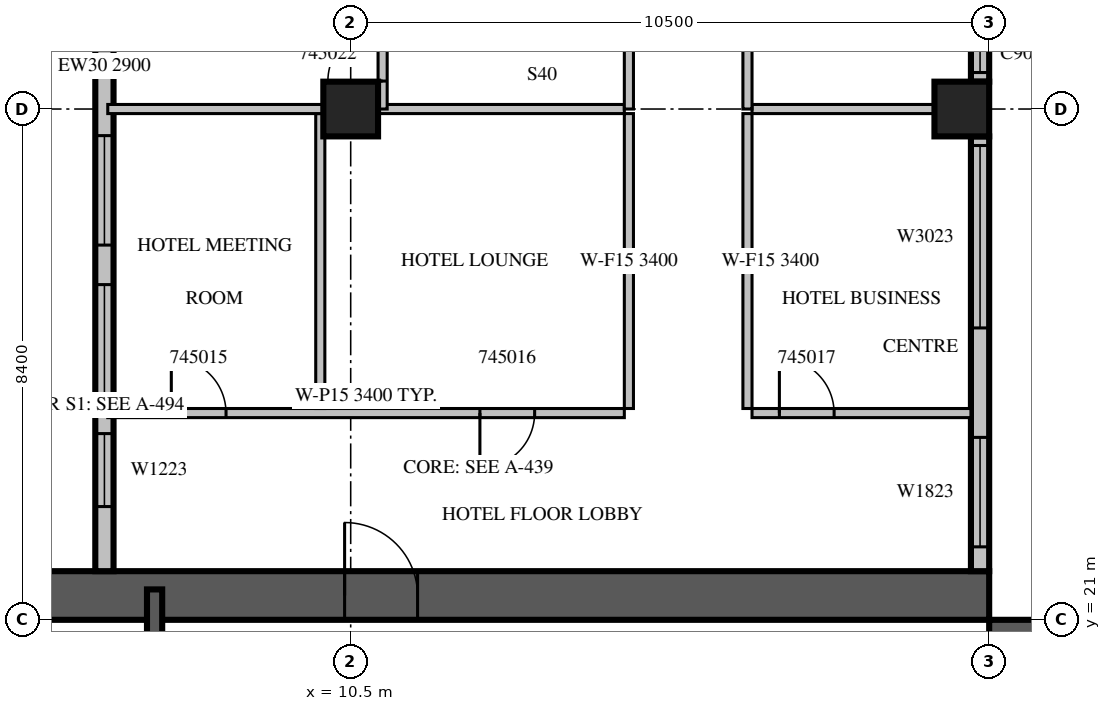
"""IFC4 building model, lengths in metres.
Left out: names, types, materials, properties, quantities, classifications, styles, units other than length and angle.
Written with IfcOpenShell. Run it as: python <this file> out.ifc"""

import sys

from ifc_helpers import new_model, si_unit, direction, frame, frame_2d, origin, origin_2d, place, context, subcontext, project, spatial, rectangle, extrude, source, transform, mapped, element, fill, save


model = new_model("IFC4")
c1 = context("Model", 3, precision=1e-05, world=origin(), true_north=direction((0.0, 1.0)))
c2 = subcontext(c1, "Body", "Model", "MODEL_VIEW")
j1 = project(units=[si_unit("LENGTHUNIT", "METRE"), si_unit("PLANEANGLEUNIT", "RADIAN")], contexts=[c1])
p1 = place(None, origin())
s1 = spatial("IfcSite", under=j1, at=p1, CompositionType="ELEMENT")
p2 = place(p1, origin())
s2 = spatial("IfcBuilding", under=s1, at=p2, CompositionType="ELEMENT")
p3 = place(p2, frame((0.0, 0.0, 204.4)))
s3 = spatial("IfcBuildingStorey", under=s2, at=p3, CompositionType="ELEMENT", Elevation=204.4)
m1 = source(origin(), c2, "Body", "SweptSolid", [
    extrude(rectangle(XDim=0.9, YDim=0.9, at=origin_2d()), origin(), (0.0, 0.0, 1.0), 3.8),
])
for number, where, z_axis, x_axis in (
    (1, (10.5, 29.4, 0.0), (0.0, 0.0, 1.0), (1.0, 0.0, 0.0)),
    (2, (20.55, 29.4, 0.0), (0.0, 0.0, 1.0), (1.0, 0.0, 0.0)),
):
    element("IfcColumn", number, at=place(p3, frame(where, z_axis=z_axis, x_axis=x_axis)), inside=s3, PredefinedType="COLUMN", context=c2, shape_type="MappedRepresentation", body=[
        mapped(m1, transform((0.0, 0.0, 0.0), scale=1.0)),
    ])
m2 = source(origin(), c2, "Body", "SweptSolid", [
    extrude(rectangle(XDim=16.8, YDim=0.8, at=frame_2d((8.4, 0.0))), origin(), (0.0, 0.0, 1.0), 3.8),
])
p4 = place(p3, frame((21.4, 4.2, 0.0), z_axis=(0.0, 0.0, 1.0), x_axis=(0.0, 1.0, 0.0)))
e3 = element("IfcWall", 3, at=p4, inside=s3, PredefinedType="SHEAR", context=c2, shape_type="MappedRepresentation", body=[
    mapped(m2, transform((0.0, 0.0, 0.0), scale=1.0)),
])
m3 = source(origin(), c2, "Body", "SweptSolid", [
    extrude(rectangle(XDim=2.2, YDim=2.1, at=frame_2d((1.1, 1.05))), frame((0.0, 0.41, 0.0), z_axis=(0.0, -1.0, 0.0), x_axis=(1.0, 0.0, 0.0)), (0.0, 0.0, 1.0), 0.82),
])
p5 = place(p4, frame((4.2, 0.0, 0.0)))
e4 = element("IfcOpeningElement", 4, at=p5, cuts=e3, PredefinedType="OPENING", context=c2, shape_type="MappedRepresentation", body=[
    mapped(m3, transform((0.0, 0.0, 0.0), scale=1.0)),
])
m4 = source(origin(), c2, "Body", "SweptSolid", [
    extrude(rectangle(XDim=1.2, YDim=2.1, at=frame_2d((0.6, 1.05))), frame((0.0, 0.41, 0.0), z_axis=(0.0, -1.0, 0.0), x_axis=(1.0, 0.0, 0.0)), (0.0, 0.0, 1.0), 0.82),
])
p6 = place(p4, frame((14.7, 0.0, 0.0)))
e5 = element("IfcOpeningElement", 5, at=p6, cuts=e3, PredefinedType="OPENING", context=c2, shape_type="MappedRepresentation", body=[
    mapped(m4, transform((0.0, 0.0, 0.0), scale=1.0)),
])
p7 = place(p3, frame((4.2, 21.4, 0.0), z_axis=(0.0, 0.0, 1.0), x_axis=(1.0, 0.0, 0.0)))
e6 = element("IfcWall", 6, at=p7, inside=s3, PredefinedType="SHEAR", context=c2, shape_type="MappedRepresentation", body=[
    mapped(m2, transform((0.0, 0.0, 0.0), scale=1.0)),
])
p8 = place(p7, frame((6.2, 0.0, 0.0)))
e7 = element("IfcOpeningElement", 7, at=p8, cuts=e6, PredefinedType="OPENING", context=c2, shape_type="MappedRepresentation", body=[
    mapped(m4, transform((0.0, 0.0, 0.0), scale=1.0)),
])
m5 = source(origin(), c2, "Body", "SweptSolid", [
    extrude(rectangle(XDim=7.15, YDim=0.3, at=frame_2d((3.575, 0.0))), origin(), (0.0, 0.0, 1.0), 3.4),
])
p9 = place(p3, frame((20.85, 21.8, 0.0), z_axis=(0.0, 0.0, 1.0), x_axis=(0.0, 1.0, 0.0)))
e8 = element("IfcWall", 8, at=p9, inside=s3, PredefinedType="STANDARD", context=c2, shape_type="MappedRepresentation", body=[
    mapped(m5, transform((0.0, 0.0, 0.0), scale=1.0)),
])
m6 = source(origin(), c2, "Body", "SweptSolid", [
    extrude(rectangle(XDim=1.8, YDim=2.3, at=frame_2d((0.9, 1.15))), frame((0.0, 0.16, 0.0), z_axis=(0.0, -1.0, 0.0), x_axis=(1.0, 0.0, 0.0)), (0.0, 0.0, 1.0), 0.32),
])
p10 = place(p9, frame((0.4, 0.0, 0.6)))
e9 = element("IfcOpeningElement", 9, at=p10, cuts=e8, PredefinedType="OPENING", context=c2, shape_type="MappedRepresentation", body=[
    mapped(m6, transform((0.0, 0.0, 0.0), scale=1.0)),
])
m7 = source(origin(), c2, "Body", "SweptSolid", [
    extrude(rectangle(XDim=3.0, YDim=2.3, at=frame_2d((1.5, 1.15))), frame((0.0, 0.16, 0.0), z_axis=(0.0, -1.0, 0.0), x_axis=(1.0, 0.0, 0.0)), (0.0, 0.0, 1.0), 0.32),
])
p11 = place(p9, frame((4.0, 0.0, 0.6)))
e10 = element("IfcOpeningElement", 10, at=p11, cuts=e8, PredefinedType="OPENING", context=c2, shape_type="MappedRepresentation", body=[
    mapped(m7, transform((0.0, 0.0, 0.0), scale=1.0)),
])
m8 = source(origin(), c2, "Body", "SweptSolid", [
    extrude(rectangle(XDim=7.5, YDim=0.3, at=frame_2d((3.75, 0.0))), origin(), (0.0, 0.0, 1.0), 2.9),
])
p12 = place(p3, frame((20.85, 29.85, 0.0), z_axis=(0.0, 0.0, 1.0), x_axis=(0.0, 1.0, 0.0)))
e11 = element("IfcWall", 11, at=p12, inside=s3, PredefinedType="STANDARD", context=c2, shape_type="MappedRepresentation", body=[
    mapped(m8, transform((0.0, 0.0, 0.0), scale=1.0)),
])
p13 = place(p12, frame((0.15, 0.0, 0.6)))
e12 = element("IfcOpeningElement", 12, at=p13, cuts=e11, PredefinedType="OPENING", context=c2, shape_type="MappedRepresentation", body=[
    mapped(m7, transform((0.0, 0.0, 0.0), scale=1.0)),
])
p14 = place(p12, frame((4.35, 0.0, 0.6)))
e13 = element("IfcOpeningElement", 13, at=p14, cuts=e11, PredefinedType="OPENING", context=c2, shape_type="MappedRepresentation", body=[
    mapped(m7, transform((0.0, 0.0, 0.0), scale=1.0)),
])
p15 = place(p3, frame((6.45, 38.4, 0.0), z_axis=(0.0, 0.0, 1.0), x_axis=(0.0, -1.0, 0.0)))
e14 = element("IfcWall", 14, at=p15, inside=s3, PredefinedType="STANDARD", context=c2, shape_type="SweptSolid", body=[
    extrude(rectangle(XDim=16.6, YDim=0.3, at=frame_2d((8.3, 0.0))), origin(), (0.0, 0.0, 1.0), 2.9),
])
p16 = place(p15, frame((1.15, 0.0, 0.6)))
e15 = element("IfcOpeningElement", 15, at=p16, cuts=e14, PredefinedType="OPENING", context=c2, shape_type="MappedRepresentation", body=[
    mapped(m6, transform((0.0, 0.0, 0.0), scale=1.0)),
])
p17 = place(p15, frame((5.162, 0.0, 0.6)))
e16 = element("IfcOpeningElement", 16, at=p17, cuts=e14, PredefinedType="OPENING", context=c2, shape_type="MappedRepresentation", body=[
    mapped(m6, transform((0.0, 0.0, 0.0), scale=1.0)),
])
p18 = place(p15, frame((9.438, 0.0, 0.6)))
e17 = element("IfcOpeningElement", 17, at=p18, cuts=e14, PredefinedType="OPENING", context=c2, shape_type="MappedRepresentation", body=[
    mapped(m6, transform((0.0, 0.0, 0.0), scale=1.0)),
])
m9 = source(origin(), c2, "Body", "SweptSolid", [
    extrude(rectangle(XDim=1.2, YDim=2.3, at=frame_2d((0.6, 1.15))), frame((0.0, 0.16, 0.0), z_axis=(0.0, -1.0, 0.0), x_axis=(1.0, 0.0, 0.0)), (0.0, 0.0, 1.0), 0.32),
])
p19 = place(p15, frame((14.338, 0.0, 0.6)))
e18 = element("IfcOpeningElement", 18, at=p19, cuts=e14, PredefinedType="OPENING", context=c2, shape_type="MappedRepresentation", body=[
    mapped(m9, transform((0.0, 0.0, 0.0), scale=1.0)),
])
p20 = place(p15, frame((11.887, 0.0, 0.6)))
e19 = element("IfcOpeningElement", 19, at=p20, cuts=e14, PredefinedType="OPENING", context=c2, shape_type="MappedRepresentation", body=[
    mapped(m6, transform((0.0, 0.0, 0.0), scale=1.0)),
])
m10 = source(origin(), c2, "Body", "SweptSolid", [
    extrude(rectangle(XDim=6.6, YDim=0.25, at=frame_2d((3.3, 0.0))), origin(), (0.0, 0.0, 1.0), 3.4),
])
p21 = place(p3, frame((7.275, 14.9, 0.0), z_axis=(0.0, 0.0, 1.0), x_axis=(0.0, 1.0, 0.0)))
e20 = element("IfcWall", 20, at=p21, inside=s3, PredefinedType="SOLIDWALL", context=c2, shape_type="MappedRepresentation", body=[
    mapped(m10, transform((0.0, 0.0, 0.0), scale=1.0)),
])
m11 = source(origin(), c2, "Body", "SweptSolid", [
    extrude(rectangle(XDim=1.1, YDim=2.1, at=frame_2d((0.55, 1.05))), frame((0.0, 0.135, 0.0), z_axis=(0.0, -1.0, 0.0), x_axis=(1.0, 0.0, 0.0)), (0.0, 0.0, 1.0), 0.27),
])
p22 = place(p21, frame((0.15, 0.0, 0.0)))
e21 = element("IfcOpeningElement", 21, at=p22, cuts=e20, PredefinedType="OPENING", context=c2, shape_type="MappedRepresentation", body=[
    mapped(m11, transform((0.0, 0.0, 0.0), scale=1.0)),
])
m12 = source(origin(), c2, "Body", "SweptSolid", [
    extrude(rectangle(XDim=8.495, YDim=0.15, at=frame_2d((4.247, 0.0))), origin(), (0.0, 0.0, 1.0), 3.4),
])
p23 = place(p3, frame((6.505, 24.4, 0.0), z_axis=(0.0, 0.0, 1.0), x_axis=(1.0, 0.0, 0.0)))
e22 = element("IfcWall", 22, at=p23, inside=s3, PredefinedType="PARTITIONING", context=c2, shape_type="MappedRepresentation", body=[
    mapped(m12, transform((0.0, 0.0, 0.0), scale=1.0)),
])
m13 = source(origin(), c2, "Body", "SweptSolid", [
    extrude(rectangle(XDim=0.9, YDim=2.1, at=frame_2d((0.45, 1.05))), frame((0.0, 0.085, 0.0), z_axis=(0.0, -1.0, 0.0), x_axis=(1.0, 0.0, 0.0)), (0.0, 0.0, 1.0), 0.17),
])
p24 = place(p23, frame((1.045, 0.0, 0.0)))
e23 = element("IfcOpeningElement", 23, at=p24, cuts=e22, PredefinedType="OPENING", context=c2, shape_type="MappedRepresentation", body=[
    mapped(m13, transform((0.0, 0.0, 0.0), scale=1.0)),
])
p25 = place(p23, frame((6.12, 0.0, 0.0)))
e24 = element("IfcOpeningElement", 24, at=p25, cuts=e22, PredefinedType="OPENING", context=c2, shape_type="MappedRepresentation", body=[
    mapped(m13, transform((0.0, 0.0, 0.0), scale=1.0)),
])
m14 = source(origin(), c2, "Body", "SweptSolid", [
    extrude(rectangle(XDim=3.6, YDim=0.15, at=frame_2d((1.8, 0.0))), origin(), (0.0, 0.0, 1.0), 3.4),
])
p26 = place(p3, frame((17.1, 24.4, 0.0), z_axis=(0.0, 0.0, 1.0), x_axis=(1.0, 0.0, 0.0)))
e25 = element("IfcWall", 25, at=p26, inside=s3, PredefinedType="PARTITIONING", context=c2, shape_type="MappedRepresentation", body=[
    mapped(m14, transform((0.0, 0.0, 0.0), scale=1.0)),
])
p27 = place(p26, frame((0.45, 0.0, 0.0)))
e26 = element("IfcOpeningElement", 26, at=p27, cuts=e25, PredefinedType="OPENING", context=c2, shape_type="MappedRepresentation", body=[
    mapped(m13, transform((0.0, 0.0, 0.0), scale=1.0)),
])
m15 = source(origin(), c2, "Body", "SweptSolid", [
    extrude(rectangle(XDim=4.85, YDim=0.15, at=frame_2d((2.425, 0.0))), origin(), (0.0, 0.0, 1.0), 3.4),
])
for number, where, z_axis, x_axis in (
    (27, (10.0, 24.475, 0.0), (0.0, 0.0, 1.0), (0.0, 1.0, 0.0)),
    (28, (15.075, 24.475, 0.0), (0.0, 0.0, 1.0), (0.0, 1.0, 0.0)),
    (29, (17.025, 29.325, 0.0), (0.0, 0.0, 1.0), (0.0, -1.0, 0.0)),
):
    element("IfcWall", number, at=place(p3, frame(where, z_axis=z_axis, x_axis=x_axis)), inside=s3, PredefinedType="PARTITIONING", context=c2, shape_type="MappedRepresentation", body=[
        mapped(m15, transform((0.0, 0.0, 0.0), scale=1.0)),
    ])
m16 = source(origin(), c2, "Body", "SweptSolid", [
    extrude(rectangle(XDim=3.546, YDim=0.15, at=frame_2d((1.773, 0.0))), origin(), (0.0, 0.0, 1.0), 3.4),
])
p28 = place(p3, frame((10.051, 29.4, 0.0), z_axis=(0.0, 0.0, 1.0), x_axis=(-1.0, 0.0, 0.0)))
e30 = element("IfcWall", 30, at=p28, inside=s3, PredefinedType="PARTITIONING", context=c2, shape_type="MappedRepresentation", body=[
    mapped(m16, transform((0.0, 0.0, 0.0), scale=1.0)),
])
m17 = source(origin(), c2, "Body", "SweptSolid", [
    extrude(rectangle(XDim=4.051, YDim=0.15, at=frame_2d((2.026, 0.0))), origin(), (0.0, 0.0, 1.0), 3.4),
])
p29 = place(p3, frame((15.0, 29.4, 0.0), z_axis=(0.0, 0.0, 1.0), x_axis=(-1.0, 0.0, 0.0)))
e31 = element("IfcWall", 31, at=p29, inside=s3, PredefinedType="PARTITIONING", context=c2, shape_type="MappedRepresentation", body=[
    mapped(m17, transform((0.0, 0.0, 0.0), scale=1.0)),
])
m18 = source(origin(), c2, "Body", "SweptSolid", [
    extrude(rectangle(XDim=3.001, YDim=0.15, at=frame_2d((1.5, 0.0))), origin(), (0.0, 0.0, 1.0), 3.4),
])
p30 = place(p3, frame((20.101, 29.4, 0.0), z_axis=(0.0, 0.0, 1.0), x_axis=(-1.0, 0.0, 0.0)))
e32 = element("IfcWall", 32, at=p30, inside=s3, PredefinedType="PARTITIONING", context=c2, shape_type="MappedRepresentation", body=[
    mapped(m18, transform((0.0, 0.0, 0.0), scale=1.0)),
])
m19 = source(origin(), c2, "Body", "SweptSolid", [
    extrude(rectangle(XDim=8.4, YDim=0.15, at=frame_2d((4.2, 0.0))), origin(), (0.0, 0.0, 1.0), 2.9),
])
p31 = place(p3, frame((11.025, 29.4, 0.0), z_axis=(0.0, 0.0, 1.0), x_axis=(0.0, 1.0, 0.0)))
e33 = element("IfcWall", 33, at=p31, inside=s3, PredefinedType="PARTITIONING", context=c2, shape_type="MappedRepresentation", body=[
    mapped(m19, transform((0.0, 0.0, 0.0), scale=1.0)),
])
p32 = place(p31, frame((1.418, 0.0, 0.0)))
e34 = element("IfcOpeningElement", 34, at=p32, cuts=e33, PredefinedType="OPENING", context=c2, shape_type="MappedRepresentation", body=[
    mapped(m13, transform((0.0, 0.0, 0.0), scale=1.0)),
])
p33 = place(p31, frame((0.46, 0.0, 0.0)))
e35 = element("IfcOpeningElement", 35, at=p33, cuts=e33, PredefinedType="OPENING", context=c2, shape_type="MappedRepresentation", body=[
    mapped(m13, transform((0.0, 0.0, 0.0), scale=1.0)),
])
p34 = place(p31, frame((4.525, 0.0, 0.0)))
e36 = element("IfcOpeningElement", 36, at=p34, cuts=e33, PredefinedType="OPENING", context=c2, shape_type="MappedRepresentation", body=[
    mapped(m13, transform((0.0, 0.0, 0.0), scale=1.0)),
])
p35 = place(p31, frame((6.387, 0.0, 0.0)))
e37 = element("IfcOpeningElement", 37, at=p35, cuts=e33, PredefinedType="OPENING", context=c2, shape_type="MappedRepresentation", body=[
    mapped(m13, transform((0.0, 0.0, 0.0), scale=1.0)),
])
p36 = place(p3, frame((15.075, 29.4, 0.0), z_axis=(0.0, 0.0, 1.0), x_axis=(0.0, 1.0, 0.0)))
e38 = element("IfcWall", 38, at=p36, inside=s3, PredefinedType="PARTITIONING", context=c2, shape_type="MappedRepresentation", body=[
    mapped(m19, transform((0.0, 0.0, 0.0), scale=1.0)),
])
m20 = source(origin(), c2, "Body", "SweptSolid", [
    extrude(rectangle(XDim=1.2, YDim=2.1, at=frame_2d((0.6, 1.05))), frame((0.0, 0.085, 0.0), z_axis=(0.0, -1.0, 0.0), x_axis=(1.0, 0.0, 0.0)), (0.0, 0.0, 1.0), 0.17),
])
p37 = place(p36, frame((1.03, 0.0, 0.0)))
e39 = element("IfcOpeningElement", 39, at=p37, cuts=e38, PredefinedType="OPENING", context=c2, shape_type="MappedRepresentation", body=[
    mapped(m20, transform((0.0, 0.0, 0.0), scale=1.0)),
])
m21 = source(origin(), c2, "Body", "SweptSolid", [
    extrude(rectangle(XDim=19.86, YDim=0.15, at=frame_2d((9.93, 0.0))), origin(), (0.0, 0.0, 1.0), 2.9),
])
p38 = place(p3, frame((17.025, 49.26, 0.0), z_axis=(0.0, 0.0, 1.0), x_axis=(0.0, -1.0, 0.0)))
e40 = element("IfcWall", 40, at=p38, inside=s3, PredefinedType="PARTITIONING", context=c2, shape_type="MappedRepresentation", body=[
    mapped(m21, transform((0.0, 0.0, 0.0), scale=1.0)),
])
m22 = source(origin(), c2, "Body", "SweptSolid", [
    extrude(rectangle(XDim=1.0, YDim=2.1, at=frame_2d((0.5, 1.05))), frame((0.0, 0.085, 0.0), z_axis=(0.0, -1.0, 0.0), x_axis=(1.0, 0.0, 0.0)), (0.0, 0.0, 1.0), 0.17),
])
p39 = place(p38, frame((15.16, 0.0, 0.0)))
e41 = element("IfcOpeningElement", 41, at=p39, cuts=e40, PredefinedType="OPENING", context=c2, shape_type="MappedRepresentation", body=[
    mapped(m22, transform((0.0, 0.0, 0.0), scale=1.0)),
])
p40 = place(p38, frame((8.412, 0.0, 0.0)))
e42 = element("IfcOpeningElement", 42, at=p40, cuts=e40, PredefinedType="OPENING", context=c2, shape_type="MappedRepresentation", body=[
    mapped(m22, transform((0.0, 0.0, 0.0), scale=1.0)),
])
p41 = place(p38, frame((3.856, 0.0, 0.0)))
e43 = element("IfcOpeningElement", 43, at=p41, cuts=e40, PredefinedType="OPENING", context=c2, shape_type="MappedRepresentation", body=[
    mapped(m22, transform((0.0, 0.0, 0.0), scale=1.0)),
])
p42 = place(p38, frame((0.636, 0.0, 0.0)))
e44 = element("IfcOpeningElement", 44, at=p42, cuts=e40, PredefinedType="OPENING", context=c2, shape_type="MappedRepresentation", body=[
    mapped(m22, transform((0.0, 0.0, 0.0), scale=1.0)),
])
m23 = source(origin(), c2, "Body", "SweptSolid", [
    extrude(rectangle(XDim=1.8, YDim=2.3, at=frame_2d((0.9, 1.15))), frame((0.0, 0.03, 0.0), z_axis=(0.0, -1.0, 0.0), x_axis=(1.0, 0.0, 0.0)), (0.0, 0.0, 1.0), 0.06),
])
p43 = place(p10, origin())
e45 = element("IfcWindow", 45, at=p43, inside=s3, PartitioningType="SINGLE_PANEL", PredefinedType="WINDOW", context=c2, shape_type="MappedRepresentation", body=[
    mapped(m23, transform((0.0, 0.0, 0.0), scale=1.0)),
])
fill(e9, e45)
m24 = source(origin(), c2, "Body", "SweptSolid", [
    extrude(rectangle(XDim=3.0, YDim=2.3, at=frame_2d((1.5, 1.15))), frame((0.0, 0.03, 0.0), z_axis=(0.0, -1.0, 0.0), x_axis=(1.0, 0.0, 0.0)), (0.0, 0.0, 1.0), 0.06),
])
p44 = place(p11, origin())
e46 = element("IfcWindow", 46, at=p44, inside=s3, PartitioningType="SINGLE_PANEL", PredefinedType="WINDOW", context=c2, shape_type="MappedRepresentation", body=[
    mapped(m24, transform((0.0, 0.0, 0.0), scale=1.0)),
])
fill(e10, e46)
p45 = place(p13, origin())
e47 = element("IfcWindow", 47, at=p45, inside=s3, PartitioningType="SINGLE_PANEL", PredefinedType="WINDOW", context=c2, shape_type="MappedRepresentation", body=[
    mapped(m24, transform((0.0, 0.0, 0.0), scale=1.0)),
])
fill(e12, e47)
p46 = place(p18, origin())
e48 = element("IfcWindow", 48, at=p46, inside=s3, PartitioningType="SINGLE_PANEL", PredefinedType="WINDOW", context=c2, shape_type="MappedRepresentation", body=[
    mapped(m23, transform((0.0, 0.0, 0.0), scale=1.0)),
])
fill(e17, e48)
m25 = source(origin(), c2, "Body", "SweptSolid", [
    extrude(rectangle(XDim=1.2, YDim=2.3, at=frame_2d((0.6, 1.15))), frame((0.0, 0.03, 0.0), z_axis=(0.0, -1.0, 0.0), x_axis=(1.0, 0.0, 0.0)), (0.0, 0.0, 1.0), 0.06),
])
p47 = place(p19, origin())
e49 = element("IfcWindow", 49, at=p47, inside=s3, PartitioningType="SINGLE_PANEL", PredefinedType="WINDOW", context=c2, shape_type="MappedRepresentation", body=[
    mapped(m25, transform((0.0, 0.0, 0.0), scale=1.0)),
])
fill(e18, e49)
p48 = place(p20, origin())
e50 = element("IfcWindow", 50, at=p48, inside=s3, PartitioningType="SINGLE_PANEL", PredefinedType="WINDOW", context=c2, shape_type="MappedRepresentation", body=[
    mapped(m23, transform((0.0, 0.0, 0.0), scale=1.0)),
])
fill(e19, e50)
m26 = source(origin(), c2, "Body", "SweptSolid", [
    extrude(rectangle(XDim=1.2, YDim=2.1, at=frame_2d((0.6, 1.05))), frame((0.0, 0.025, 0.0), z_axis=(0.0, -1.0, 0.0), x_axis=(1.0, 0.0, 0.0)), (0.0, 0.0, 1.0), 0.05),
])
p49 = place(p8, origin())
e51 = element("IfcDoor", 51, at=p49, inside=s3, OperationType="SINGLE_SWING_LEFT", PredefinedType="DOOR", context=c2, shape_type="MappedRepresentation", body=[
    mapped(m26, transform((0.0, 0.0, 0.0), scale=1.0)),
])
fill(e7, e51)
m27 = source(origin(), c2, "Body", "SweptSolid", [
    extrude(rectangle(XDim=0.9, YDim=2.1, at=frame_2d((0.45, 1.05))), frame((0.0, 0.025, 0.0), z_axis=(0.0, -1.0, 0.0), x_axis=(1.0, 0.0, 0.0)), (0.0, 0.0, 1.0), 0.05),
])
p50 = place(p24, origin())
e52 = element("IfcDoor", 52, at=p50, inside=s3, OperationType="SINGLE_SWING_LEFT", PredefinedType="DOOR", context=c2, shape_type="MappedRepresentation", body=[
    mapped(m27, transform((0.0, 0.0, 0.0), scale=1.0)),
])
fill(e23, e52)
p51 = place(p25, origin())
e53 = element("IfcDoor", 53, at=p51, inside=s3, OperationType="SINGLE_SWING_RIGHT", PredefinedType="DOOR", context=c2, shape_type="MappedRepresentation", body=[
    mapped(m27, transform((0.0, 0.0, 0.0), scale=1.0)),
])
fill(e24, e53)
p52 = place(p27, origin())
e54 = element("IfcDoor", 54, at=p52, inside=s3, OperationType="SINGLE_SWING_LEFT", PredefinedType="DOOR", context=c2, shape_type="MappedRepresentation", body=[
    mapped(m27, transform((0.0, 0.0, 0.0), scale=1.0)),
])
fill(e26, e54)
p53 = place(p33, origin())
e55 = element("IfcDoor", 55, at=p53, inside=s3, OperationType="SINGLE_SWING_LEFT", PredefinedType="DOOR", context=c2, shape_type="MappedRepresentation", body=[
    mapped(m27, transform((0.0, 0.0, 0.0), scale=1.0)),
])
fill(e35, e55)
save(model, sys.argv[1])
